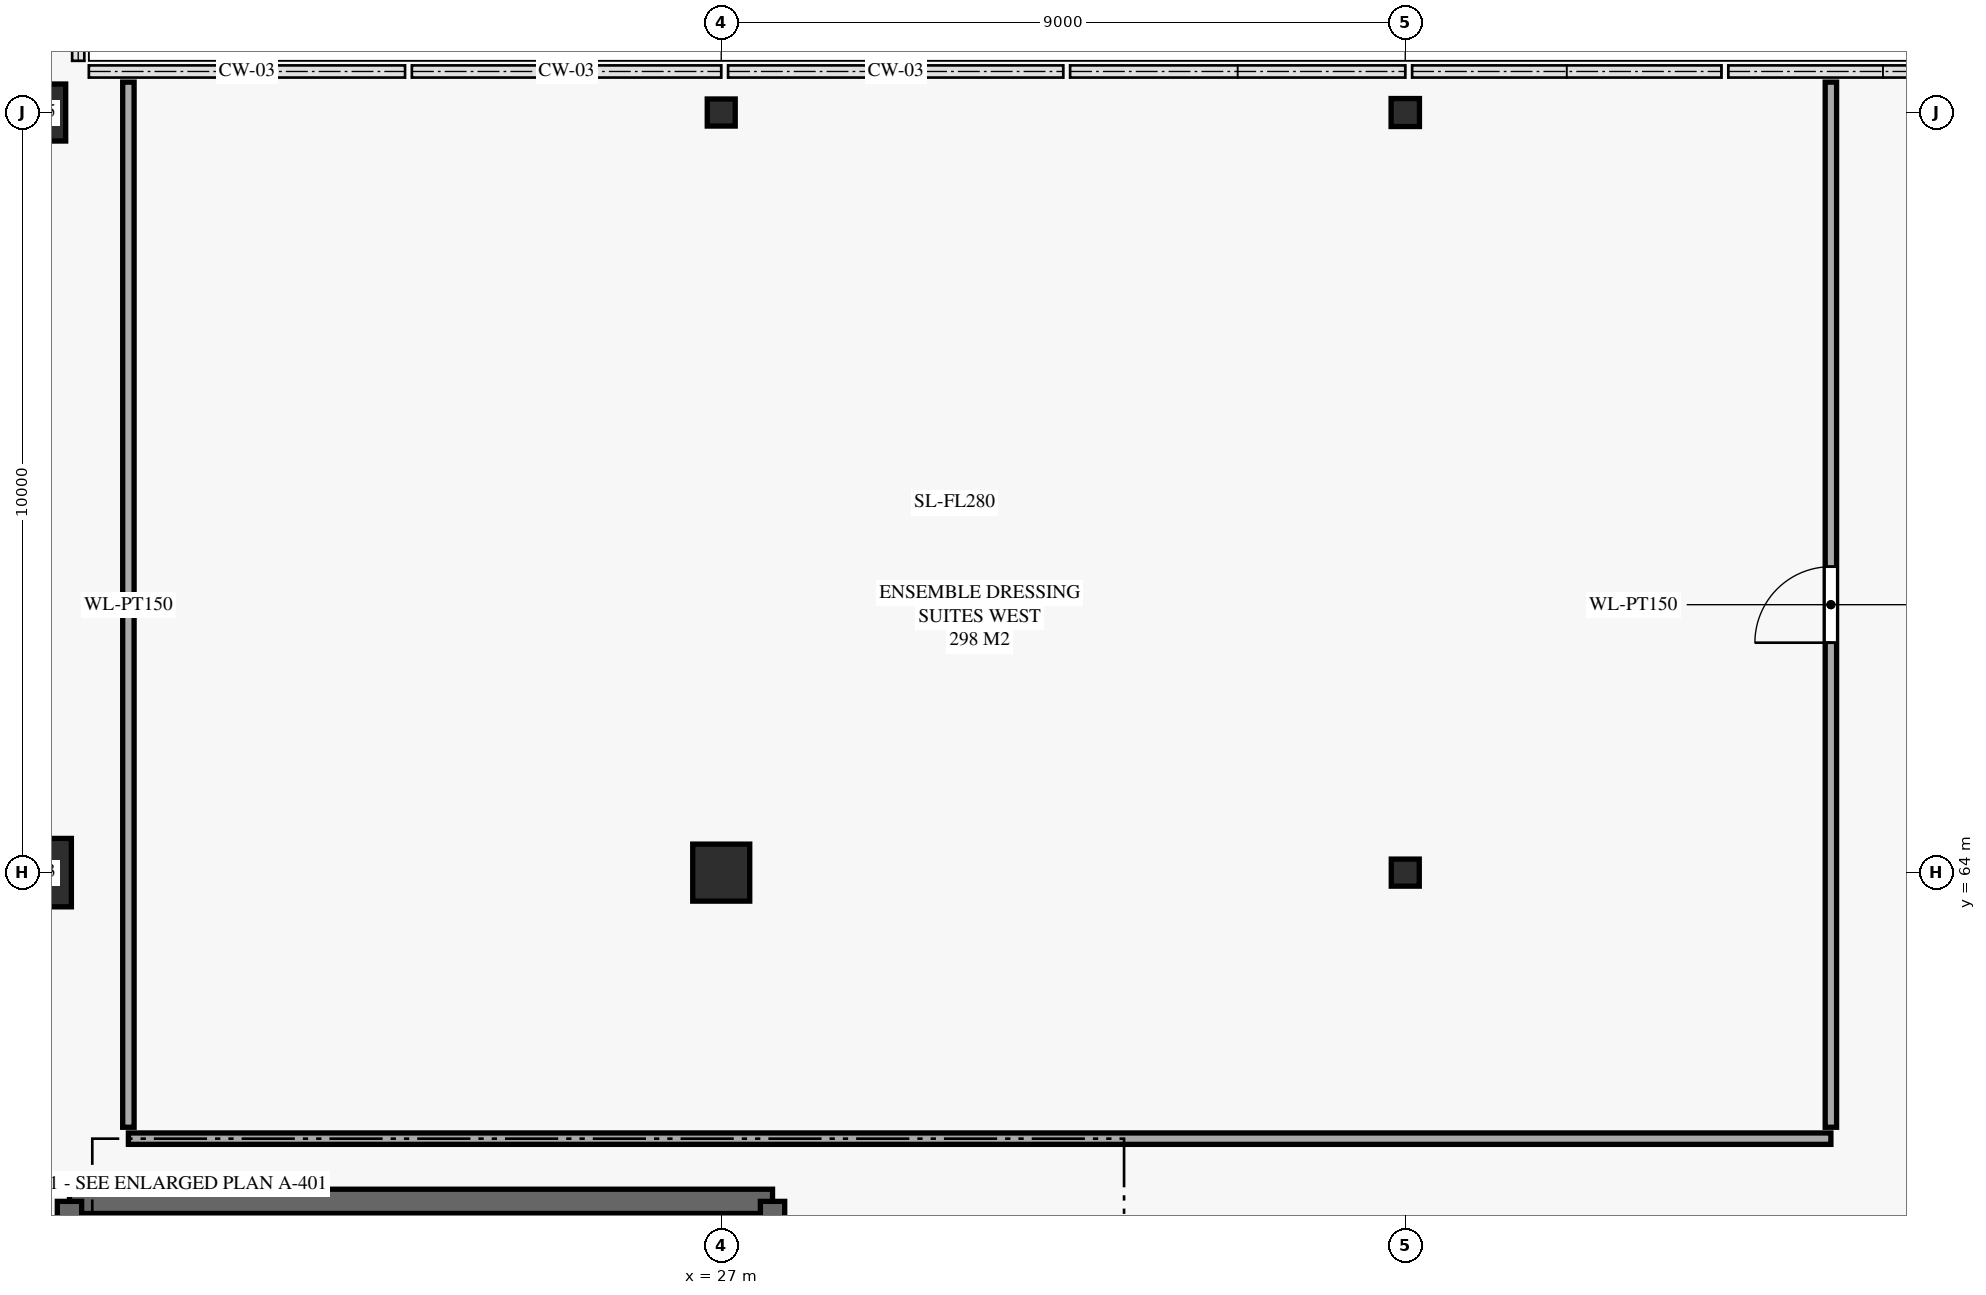
"""IFC4 building model, lengths in metres.
Left out: names, types, materials, properties, quantities, classifications, styles, units other than length and angle.
Written with IfcOpenShell. Run it as: python <this file> out.ifc"""

import sys

from ifc_helpers import new_model, si_unit, direction, frame, frame_2d, origin, origin_2d, place, context, subcontext, project, spatial, rectangle, i_section, extrude, element, fill, save


model = new_model("IFC4")
c1 = context("Model", 3, precision=1e-05, world=origin(), true_north=direction((0.0, 1.0)))
c2 = subcontext(c1, "Body", "Model", "MODEL_VIEW")
j1 = project(units=[si_unit("LENGTHUNIT", "METRE"), si_unit("PLANEANGLEUNIT", "RADIAN")], contexts=[c1])
p1 = place(None, origin())
s1 = spatial("IfcSite", under=j1, at=p1, CompositionType="ELEMENT")
p2 = place(p1, origin())
s2 = spatial("IfcBuilding", under=s1, at=p2, CompositionType="ELEMENT")
p3 = place(p2, frame((0.0, 0.0, 5.0)))
s3 = spatial("IfcBuildingStorey", under=s2, at=p3, CompositionType="ELEMENT", Elevation=5.0)
p4 = place(p3, frame((18.0, 64.0, 0.0), z_axis=(0.0, 0.0, 1.0), x_axis=(1.0, 0.0, 0.0)))
e1 = element("IfcColumn", 1, at=p4, inside=s3, PredefinedType="COLUMN", context=c2, shape_type="SweptSolid", body=[
    extrude(rectangle(XDim=0.9, YDim=0.9, at=origin_2d()), origin(), (0.0, 0.0, 1.0), 5.0),
])
for number, where, z_axis, x_axis in (
    (2, (18.0, 74.0, 0.0), (0.0, 0.0, 1.0), (1.0, 0.0, 0.0)),
    (3, (27.0, 64.0, 0.0), (0.0, 0.0, 1.0), (1.0, 0.0, 0.0)),
):
    element("IfcColumn", number, at=place(p3, frame(where, z_axis=z_axis, x_axis=x_axis)), inside=s3, PredefinedType="COLUMN", context=c2, shape_type="SweptSolid", body=[
        extrude(rectangle(XDim=0.75, YDim=0.75, at=origin_2d()), origin(), (0.0, 0.0, 1.0), 5.0),
    ])
for number, where, z_axis, x_axis in (
    (4, (27.0, 74.0, 0.0), (0.0, 0.0, 1.0), (1.0, 0.0, 0.0)),
    (5, (36.0, 64.0, 0.0), (0.0, 0.0, 1.0), (1.0, 0.0, 0.0)),
):
    element("IfcColumn", number, at=place(p3, frame(where, z_axis=z_axis, x_axis=x_axis)), inside=s3, PredefinedType="COLUMN", context=c2, shape_type="SweptSolid", body=[
        extrude(i_section(OverallWidth=0.368, OverallDepth=0.356, WebThickness=0.011, FlangeThickness=0.018, FilletRadius=0.015, at=origin_2d()), origin(), (0.0, 0.0, 1.0), 5.0),
    ])
p5 = place(p3, frame((36.0, 74.0, 0.0), z_axis=(0.0, 0.0, 1.0), x_axis=(1.0, 0.0, 0.0)))
e6 = element("IfcColumn", 6, at=p5, inside=s3, PredefinedType="COLUMN", context=c2, shape_type="SweptSolid", body=[
    extrude(i_section(OverallWidth=0.373, OverallDepth=0.368, WebThickness=0.015, FlangeThickness=0.024, FilletRadius=0.015, at=origin_2d()), origin(), (0.0, 0.0, 1.0), 5.0),
])
p6 = place(p3, frame((27.675, 59.675, 0.0), z_axis=(0.0, 0.0, 1.0), x_axis=(-1.0, 0.0, 0.0)))
e7 = element("IfcWall", 7, at=p6, inside=s3, PredefinedType="SHEAR", context=c2, shape_type="SweptSolid", body=[
    extrude(rectangle(XDim=9.25, YDim=0.32, at=frame_2d((4.625, 0.0))), origin(), (0.0, 0.0, 1.0), 4.68),
])
p7 = place(p3, frame((18.425, 59.675, 0.0), z_axis=(0.0, 0.0, 1.0), x_axis=(0.0, -1.0, 0.0)))
e8 = element("IfcWall", 8, at=p7, inside=s3, PredefinedType="SHEAR", context=c2, shape_type="SweptSolid", body=[
    extrude(rectangle(XDim=5.05, YDim=0.32, at=frame_2d((2.525, 0.0))), origin(), (0.0, 0.0, 1.0), 4.68),
])
p8 = place(p7, frame((1.85, 0.0, 0.0)))
e9 = element("IfcOpeningElement", 9, at=p8, cuts=e8, PredefinedType="OPENING", context=c2, shape_type="SweptSolid", body=[
    extrude(rectangle(XDim=1.15, YDim=2.2, at=frame_2d((0.575, 1.1))), frame((0.0, 0.17, 0.0), z_axis=(0.0, -1.0, 0.0), x_axis=(1.0, 0.0, 0.0)), (0.0, 0.0, 1.0), 0.34),
])
p9 = place(p3, frame((27.675, 54.625, 0.0), z_axis=(0.0, 0.0, 1.0), x_axis=(0.0, 1.0, 0.0)))
e10 = element("IfcWall", 10, at=p9, inside=s3, PredefinedType="SHEAR", context=c2, shape_type="SweptSolid", body=[
    extrude(rectangle(XDim=5.05, YDim=0.32, at=frame_2d((2.525, 0.0))), origin(), (0.0, 0.0, 1.0), 4.68),
])
p10 = place(p3, frame((19.2, 60.5, 0.0), z_axis=(0.0, 0.0, 1.0), x_axis=(1.0, 0.0, 0.0)))
e11 = element("IfcWall", 11, at=p10, inside=s3, PredefinedType="PARTITIONING", context=c2, shape_type="SweptSolid", body=[
    extrude(rectangle(XDim=22.4, YDim=0.15, at=frame_2d((11.2, 0.0))), origin(), (0.0, 0.0, 1.0), 4.68),
])
p11 = place(p3, frame((19.2, 74.4, 0.0), z_axis=(0.0, 0.0, 1.0), x_axis=(0.0, -1.0, 0.0)))
e12 = element("IfcWall", 12, at=p11, inside=s3, PredefinedType="PARTITIONING", context=c2, shape_type="SweptSolid", body=[
    extrude(rectangle(XDim=13.75, YDim=0.15, at=frame_2d((6.875, 0.0))), origin(), (0.0, 0.0, 1.0), 4.68),
])
p12 = place(p3, frame((41.6, 60.65, 0.0), z_axis=(0.0, 0.0, 1.0), x_axis=(0.0, 1.0, 0.0)))
e13 = element("IfcWall", 13, at=p12, inside=s3, PredefinedType="PARTITIONING", context=c2, shape_type="SweptSolid", body=[
    extrude(rectangle(XDim=13.75, YDim=0.15, at=frame_2d((6.875, 0.0))), origin(), (0.0, 0.0, 1.0), 4.68),
])
p13 = place(p12, frame((6.375, 0.0, 0.0)))
e14 = element("IfcOpeningElement", 14, at=p13, cuts=e13, PredefinedType="OPENING", context=c2, shape_type="SweptSolid", body=[
    extrude(rectangle(XDim=1.0, YDim=2.15, at=frame_2d((0.5, 1.075))), frame((0.0, 0.085, 0.0), z_axis=(0.0, -1.0, 0.0), x_axis=(1.0, 0.0, 0.0)), (0.0, 0.0, 1.0), 0.17),
])
p14 = place(p13, origin())
e15 = element("IfcDoor", 15, at=p14, inside=s3, OperationType="SINGLE_SWING_LEFT", PredefinedType="DOOR", context=c2, shape_type="SweptSolid", body=[
    extrude(rectangle(XDim=1.0, YDim=2.15, at=frame_2d((0.5, 1.075))), frame((0.0, 0.025, 0.0), z_axis=(0.0, -1.0, 0.0), x_axis=(1.0, 0.0, 0.0)), (0.0, 0.0, 1.0), 0.05),
])
fill(e14, e15)
save(model, sys.argv[1])
